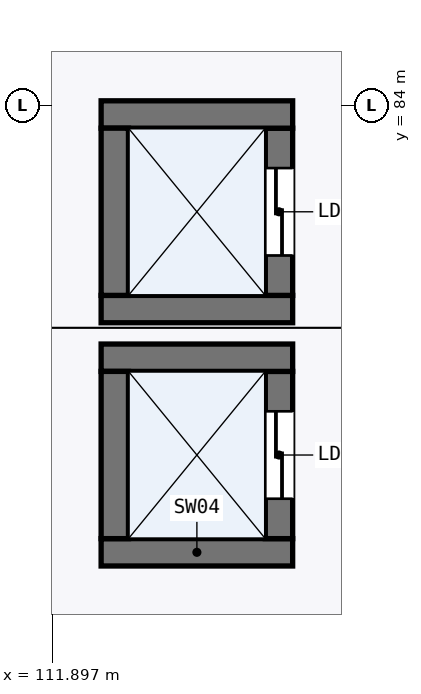
"""IFC4 building model, lengths in metres.
Left out: names, types, materials, properties, quantities, classifications, styles, units other than length and angle.
Written with IfcOpenShell. Run it as: python <this file> out.ifc"""

import sys

from ifc_helpers import new_model, si_unit, direction, frame, frame_2d, origin, place, context, subcontext, project, spatial, rectangle, extrude, element, fill, save


model = new_model("IFC4")
c1 = context("Model", 3, precision=1e-05, world=origin(), true_north=direction((0.0, 1.0)))
c2 = subcontext(c1, "Body", "Model", "MODEL_VIEW")
j1 = project(units=[si_unit("LENGTHUNIT", "METRE"), si_unit("PLANEANGLEUNIT", "RADIAN")], contexts=[c1])
p1 = place(None, origin())
s1 = spatial("IfcSite", under=j1, at=p1, CompositionType="ELEMENT")
p2 = place(p1, origin())
s2 = spatial("IfcBuilding", under=s1, at=p2, CompositionType="ELEMENT")
p3 = place(p2, origin())
s3 = spatial("IfcBuildingStorey", under=s2, at=p3, CompositionType="ELEMENT", Elevation=0.0)
p4 = place(p3, frame((112.54, 78.12, 0.0), z_axis=(0.0, 0.0, 1.0), x_axis=(1.0, 0.0, 0.0)))
e1 = element("IfcWall", 1, at=p4, inside=s3, PredefinedType="SHEAR", context=c2, shape_type="SweptSolid", body=[
    extrude(rectangle(XDim=2.52, YDim=0.36, at=frame_2d((1.26, 0.0))), origin(), (0.0, 0.0, 1.0), 5.745),
])
p5 = place(p3, frame((114.88, 78.3, 0.0), z_axis=(0.0, 0.0, 1.0), x_axis=(0.0, 1.0, 0.0)))
e2 = element("IfcWall", 2, at=p5, inside=s3, PredefinedType="SHEAR", context=c2, shape_type="SweptSolid", body=[
    extrude(rectangle(XDim=2.2, YDim=0.36, at=frame_2d((1.1, 0.0))), origin(), (0.0, 0.0, 1.0), 5.745),
])
p6 = place(p5, frame((0.525, 0.0, 0.0)))
e3 = element("IfcOpeningElement", 3, at=p6, cuts=e2, PredefinedType="OPENING", context=c2, shape_type="SweptSolid", body=[
    extrude(rectangle(XDim=1.15, YDim=2.2, at=frame_2d((0.575, 1.1))), frame((0.0, 0.19, 0.0), z_axis=(0.0, -1.0, 0.0), x_axis=(1.0, 0.0, 0.0)), (0.0, 0.0, 1.0), 0.38),
])
p7 = place(p3, frame((115.06, 80.68, 0.0), z_axis=(0.0, 0.0, 1.0), x_axis=(-1.0, 0.0, 0.0)))
e4 = element("IfcWall", 4, at=p7, inside=s3, PredefinedType="SHEAR", context=c2, shape_type="SweptSolid", body=[
    extrude(rectangle(XDim=2.52, YDim=0.36, at=frame_2d((1.26, 0.0))), origin(), (0.0, 0.0, 1.0), 5.745),
])
p8 = place(p3, frame((112.72, 80.5, 0.0), z_axis=(0.0, 0.0, 1.0), x_axis=(0.0, -1.0, 0.0)))
e5 = element("IfcWall", 5, at=p8, inside=s3, PredefinedType="SHEAR", context=c2, shape_type="SweptSolid", body=[
    extrude(rectangle(XDim=2.2, YDim=0.36, at=frame_2d((1.1, 0.0))), origin(), (0.0, 0.0, 1.0), 5.745),
])
p9 = place(p3, frame((112.54, 81.32, 0.0), z_axis=(0.0, 0.0, 1.0), x_axis=(1.0, 0.0, 0.0)))
e6 = element("IfcWall", 6, at=p9, inside=s3, PredefinedType="SHEAR", context=c2, shape_type="SweptSolid", body=[
    extrude(rectangle(XDim=2.52, YDim=0.36, at=frame_2d((1.26, 0.0))), origin(), (0.0, 0.0, 1.0), 5.745),
])
p10 = place(p3, frame((114.88, 81.5, 0.0), z_axis=(0.0, 0.0, 1.0), x_axis=(0.0, 1.0, 0.0)))
e7 = element("IfcWall", 7, at=p10, inside=s3, PredefinedType="SHEAR", context=c2, shape_type="SweptSolid", body=[
    extrude(rectangle(XDim=2.2, YDim=0.36, at=frame_2d((1.1, 0.0))), origin(), (0.0, 0.0, 1.0), 5.745),
])
p11 = place(p10, frame((0.525, 0.0, 0.0)))
e8 = element("IfcOpeningElement", 8, at=p11, cuts=e7, PredefinedType="OPENING", context=c2, shape_type="SweptSolid", body=[
    extrude(rectangle(XDim=1.15, YDim=2.2, at=frame_2d((0.575, 1.1))), frame((0.0, 0.19, 0.0), z_axis=(0.0, -1.0, 0.0), x_axis=(1.0, 0.0, 0.0)), (0.0, 0.0, 1.0), 0.38),
])
p12 = place(p3, frame((115.06, 83.88, 0.0), z_axis=(0.0, 0.0, 1.0), x_axis=(-1.0, 0.0, 0.0)))
e9 = element("IfcWall", 9, at=p12, inside=s3, PredefinedType="SHEAR", context=c2, shape_type="SweptSolid", body=[
    extrude(rectangle(XDim=2.52, YDim=0.36, at=frame_2d((1.26, 0.0))), origin(), (0.0, 0.0, 1.0), 5.745),
])
p13 = place(p3, frame((112.72, 83.7, 0.0), z_axis=(0.0, 0.0, 1.0), x_axis=(0.0, -1.0, 0.0)))
e10 = element("IfcWall", 10, at=p13, inside=s3, PredefinedType="SHEAR", context=c2, shape_type="SweptSolid", body=[
    extrude(rectangle(XDim=2.2, YDim=0.36, at=frame_2d((1.1, 0.0))), origin(), (0.0, 0.0, 1.0), 5.745),
])
p14 = place(p6, frame((1.15, 0.0, 0.0), z_axis=(0.0, 0.0, 1.0), x_axis=(-1.0, 0.0, 0.0)))
e11 = element("IfcDoor", 11, at=p14, inside=s3, OperationType="DOUBLE_DOOR_SLIDING", PredefinedType="DOOR", context=c2, shape_type="SweptSolid", body=[
    extrude(rectangle(XDim=1.15, YDim=2.2, at=frame_2d((0.575, 1.1))), frame((0.0, 0.025, 0.0), z_axis=(0.0, -1.0, 0.0), x_axis=(1.0, 0.0, 0.0)), (0.0, 0.0, 1.0), 0.05),
])
fill(e3, e11)
p15 = place(p11, frame((1.15, 0.0, 0.0), z_axis=(0.0, 0.0, 1.0), x_axis=(-1.0, 0.0, 0.0)))
e12 = element("IfcDoor", 12, at=p15, inside=s3, OperationType="DOUBLE_DOOR_SLIDING", PredefinedType="DOOR", context=c2, shape_type="SweptSolid", body=[
    extrude(rectangle(XDim=1.15, YDim=2.2, at=frame_2d((0.575, 1.1))), frame((0.0, 0.025, 0.0), z_axis=(0.0, -1.0, 0.0), x_axis=(1.0, 0.0, 0.0)), (0.0, 0.0, 1.0), 0.05),
])
fill(e8, e12)
save(model, sys.argv[1])
